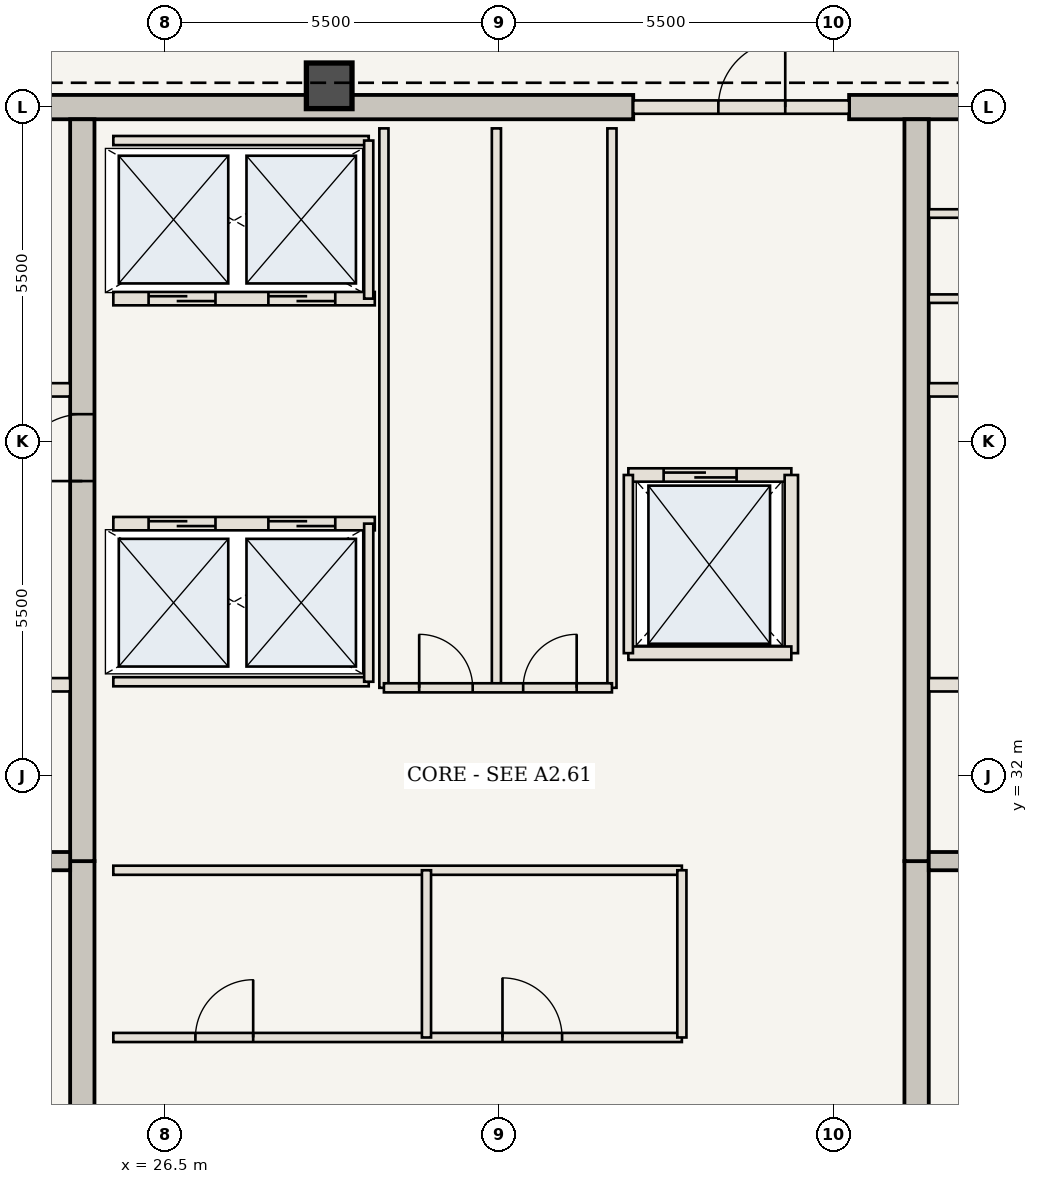
"""IFC4 building model, lengths in metres.
Left out: names, types, materials, properties, quantities, classifications, styles, units other than length and angle.
Written with IfcOpenShell. Run it as: python <this file> out.ifc"""

import sys

from ifc_helpers import new_model, si_unit, direction, frame, frame_2d, origin, origin_2d, place, context, subcontext, project, spatial, rectangle, extrude, element, fill, save


model = new_model("IFC4")
c1 = context("Model", 3, precision=1e-05, world=origin(), true_north=direction((0.0, 1.0)))
c2 = subcontext(c1, "Body", "Model", "MODEL_VIEW")
j1 = project(units=[si_unit("LENGTHUNIT", "METRE"), si_unit("PLANEANGLEUNIT", "RADIAN")], contexts=[c1])
p1 = place(None, origin())
s1 = spatial("IfcSite", under=j1, at=p1, CompositionType="ELEMENT")
p2 = place(p1, origin())
s2 = spatial("IfcBuilding", under=s1, at=p2, CompositionType="ELEMENT")
p3 = place(p2, frame((0.0, 0.0, 281.4)))
s3 = spatial("IfcBuildingStorey", under=s2, at=p3, CompositionType="ELEMENT", Elevation=281.4)
p4 = place(p3, frame((21.41, 43.0, 0.0), z_axis=(0.0, 0.0, 1.0), x_axis=(1.0, 0.0, 0.0)))
e1 = element("IfcWall", 1, at=p4, inside=s3, PredefinedType="SHEAR", context=c2, shape_type="SweptSolid", body=[
    extrude(rectangle(XDim=12.79, YDim=0.4, at=frame_2d((6.395, 0.0))), origin(), (0.0, 0.0, 1.0), 3.85),
])
p5 = place(p3, frame((37.75, 43.0, 0.0), z_axis=(0.0, 0.0, 1.0), x_axis=(1.0, 0.0, 0.0)))
e2 = element("IfcWall", 2, at=p5, inside=s3, PredefinedType="SHEAR", context=c2, shape_type="SweptSolid", body=[
    extrude(rectangle(XDim=4.84, YDim=0.4, at=frame_2d((2.42, 0.0))), origin(), (0.0, 0.0, 1.0), 3.85),
])
p6 = place(p3, frame((25.14, 21.15, 0.0), z_axis=(0.0, 0.0, 1.0), x_axis=(0.0, 1.0, 0.0)))
e3 = element("IfcWall", 3, at=p6, inside=s3, PredefinedType="SHEAR", context=c2, shape_type="SweptSolid", body=[
    extrude(rectangle(XDim=9.45, YDim=0.4, at=frame_2d((4.725, 0.0))), origin(), (0.0, 0.0, 1.0), 3.85),
])
p7 = place(p3, frame((25.14, 30.6, 0.0), z_axis=(0.0, 0.0, 1.0), x_axis=(0.0, 1.0, 0.0)))
e4 = element("IfcWall", 4, at=p7, inside=s3, PredefinedType="SHEAR", context=c2, shape_type="SweptSolid", body=[
    extrude(rectangle(XDim=12.2, YDim=0.4, at=frame_2d((6.1, 0.0))), origin(), (0.0, 0.0, 1.0), 3.85),
])
p8 = place(p7, frame((6.25, 0.0, 0.0)))
e5 = element("IfcOpeningElement", 5, at=p8, cuts=e4, PredefinedType="OPENING", context=c2, shape_type="SweptSolid", body=[
    extrude(rectangle(XDim=1.1, YDim=2.15, at=frame_2d((0.55, 1.075))), frame((0.0, 0.21, 0.0), z_axis=(0.0, -1.0, 0.0), x_axis=(1.0, 0.0, 0.0)), (0.0, 0.0, 1.0), 0.42),
])
p9 = place(p3, frame((38.86, 21.15, 0.0), z_axis=(0.0, 0.0, 1.0), x_axis=(0.0, 1.0, 0.0)))
e6 = element("IfcWall", 6, at=p9, inside=s3, PredefinedType="SHEAR", context=c2, shape_type="SweptSolid", body=[
    extrude(rectangle(XDim=9.45, YDim=0.4, at=frame_2d((4.725, 0.0))), origin(), (0.0, 0.0, 1.0), 3.85),
])
p10 = place(p3, frame((38.86, 30.6, 0.0), z_axis=(0.0, 0.0, 1.0), x_axis=(0.0, 1.0, 0.0)))
e7 = element("IfcWall", 7, at=p10, inside=s3, PredefinedType="SHEAR", context=c2, shape_type="SweptSolid", body=[
    extrude(rectangle(XDim=12.2, YDim=0.4, at=frame_2d((6.1, 0.0))), origin(), (0.0, 0.0, 1.0), 3.85),
])
p11 = place(p3, frame((29.2, 43.35, 0.0), z_axis=(0.0, 0.0, 1.0), x_axis=(1.0, 0.0, 0.0)))
e8 = element("IfcColumn", 8, at=p11, inside=s3, PredefinedType="COLUMN", context=c2, shape_type="SweptSolid", body=[
    extrude(rectangle(XDim=0.75, YDim=0.75, at=origin_2d()), origin(), (0.0, 0.0, 1.0), 3.85),
])
for number, where, z_axis, x_axis in (
    (9, (21.41, 30.6, 0.0), (0.0, 0.0, 1.0), (1.0, 0.0, 0.0)),
    (10, (39.06, 30.6, 0.0), (0.0, 0.0, 1.0), (1.0, 0.0, 0.0)),
):
    element("IfcWall", number, at=place(p3, frame(where, z_axis=z_axis, x_axis=x_axis)), inside=s3, PredefinedType="SHEAR", context=c2, shape_type="SweptSolid", body=[
        extrude(rectangle(XDim=3.53, YDim=0.3, at=frame_2d((1.765, 0.0))), origin(), (0.0, 0.0, 1.0), 3.685),
    ])
p12 = place(p3, frame((21.41, 33.5, 0.0), z_axis=(0.0, 0.0, 1.0), x_axis=(1.0, 0.0, 0.0)))
e11 = element("IfcWall", 11, at=p12, inside=s3, PredefinedType="STANDARD", context=c2, shape_type="SweptSolid", body=[
    extrude(rectangle(XDim=3.53, YDim=0.22, at=frame_2d((1.765, 0.0))), origin(), (0.0, 0.0, 1.0), 3.685),
])
p13 = place(p12, frame((0.75, 0.0, 0.0)))
e12 = element("IfcOpeningElement", 12, at=p13, cuts=e11, PredefinedType="OPENING", context=c2, shape_type="SweptSolid", body=[
    extrude(rectangle(XDim=1.2, YDim=2.2, at=frame_2d((0.6, 1.1))), frame((0.0, 0.12, 0.0), z_axis=(0.0, -1.0, 0.0), x_axis=(1.0, 0.0, 0.0)), (0.0, 0.0, 1.0), 0.24),
])
p14 = place(p3, frame((39.06, 33.5, 0.0), z_axis=(0.0, 0.0, 1.0), x_axis=(1.0, 0.0, 0.0)))
e13 = element("IfcWall", 13, at=p14, inside=s3, PredefinedType="STANDARD", context=c2, shape_type="SweptSolid", body=[
    extrude(rectangle(XDim=3.53, YDim=0.22, at=frame_2d((1.765, 0.0))), origin(), (0.0, 0.0, 1.0), 3.685),
])
p15 = place(p14, frame((1.55, 0.0, 0.0)))
e14 = element("IfcOpeningElement", 14, at=p15, cuts=e13, PredefinedType="OPENING", context=c2, shape_type="SweptSolid", body=[
    extrude(rectangle(XDim=1.2, YDim=2.2, at=frame_2d((0.6, 1.1))), frame((0.0, 0.12, 0.0), z_axis=(0.0, -1.0, 0.0), x_axis=(1.0, 0.0, 0.0)), (0.0, 0.0, 1.0), 0.24),
])
for number, where, z_axis, x_axis in (
    (15, (21.41, 38.35, 0.0), (0.0, 0.0, 1.0), (1.0, 0.0, 0.0)),
    (16, (39.06, 38.35, 0.0), (0.0, 0.0, 1.0), (1.0, 0.0, 0.0)),
):
    element("IfcWall", number, at=place(p3, frame(where, z_axis=z_axis, x_axis=x_axis)), inside=s3, PredefinedType="STANDARD", context=c2, shape_type="SweptSolid", body=[
        extrude(rectangle(XDim=3.53, YDim=0.22, at=frame_2d((1.765, 0.0))), origin(), (0.0, 0.0, 1.0), 3.685),
    ])
for number, where, z_axis, x_axis in (
    (17, (39.06, 39.85, 0.0), (0.0, 0.0, 1.0), (1.0, 0.0, 0.0)),
    (18, (39.06, 41.25, 0.0), (0.0, 0.0, 1.0), (1.0, 0.0, 0.0)),
):
    element("IfcWall", number, at=place(p3, frame(where, z_axis=z_axis, x_axis=x_axis)), inside=s3, PredefinedType="STANDARD", context=c2, shape_type="SweptSolid", body=[
        extrude(rectangle(XDim=3.53, YDim=0.14, at=frame_2d((1.765, 0.0))), origin(), (0.0, 0.0, 1.0), 3.685),
    ])
p16 = place(p3, frame((25.65, 27.7, 0.0), z_axis=(0.0, 0.0, 1.0), x_axis=(1.0, 0.0, 0.0)))
e19 = element("IfcWall", 19, at=p16, inside=s3, PredefinedType="STANDARD", context=c2, shape_type="SweptSolid", body=[
    extrude(rectangle(XDim=9.35, YDim=0.15, at=frame_2d((4.675, 0.0))), origin(), (0.0, 0.0, 1.0), 3.685),
])
p17 = place(p16, frame((1.35, 0.0, 0.0)))
e20 = element("IfcOpeningElement", 20, at=p17, cuts=e19, PredefinedType="OPENING", context=c2, shape_type="SweptSolid", body=[
    extrude(rectangle(XDim=0.95, YDim=2.15, at=frame_2d((0.475, 1.075))), frame((0.0, 0.085, 0.0), z_axis=(0.0, -1.0, 0.0), x_axis=(1.0, 0.0, 0.0)), (0.0, 0.0, 1.0), 0.17),
])
p18 = place(p16, frame((6.4, 0.0, 0.0)))
e21 = element("IfcOpeningElement", 21, at=p18, cuts=e19, PredefinedType="OPENING", context=c2, shape_type="SweptSolid", body=[
    extrude(rectangle(XDim=0.98, YDim=2.2, at=frame_2d((0.49, 1.1))), frame((0.0, 0.085, 0.0), z_axis=(0.0, -1.0, 0.0), x_axis=(1.0, 0.0, 0.0)), (0.0, 0.0, 1.0), 0.17),
])
p19 = place(p3, frame((25.65, 30.45, 0.0), z_axis=(0.0, 0.0, 1.0), x_axis=(1.0, 0.0, 0.0)))
e22 = element("IfcWall", 22, at=p19, inside=s3, PredefinedType="STANDARD", context=c2, shape_type="SweptSolid", body=[
    extrude(rectangle(XDim=9.35, YDim=0.15, at=frame_2d((4.675, 0.0))), origin(), (0.0, 0.0, 1.0), 3.685),
])
for number, where, z_axis, x_axis in (
    (23, (30.8, 27.7, 0.0), (0.0, 0.0, 1.0), (0.0, 1.0, 0.0)),
    (24, (35.0, 27.7, 0.0), (0.0, 0.0, 1.0), (0.0, 1.0, 0.0)),
):
    element("IfcWall", number, at=place(p3, frame(where, z_axis=z_axis, x_axis=x_axis)), inside=s3, PredefinedType="STANDARD", context=c2, shape_type="SweptSolid", body=[
        extrude(rectangle(XDim=2.75, YDim=0.15, at=frame_2d((1.375, 0.0))), origin(), (0.0, 0.0, 1.0), 3.685),
    ])
p20 = place(p3, frame((25.65, 36.15, 0.0), z_axis=(0.0, 0.0, 1.0), x_axis=(1.0, 0.0, 0.0)))
e25 = element("IfcWall", 25, at=p20, inside=s3, PredefinedType="STANDARD", context=c2, shape_type="SweptSolid", body=[
    extrude(rectangle(XDim=4.3, YDim=0.22, at=frame_2d((2.15, 0.0))), origin(), (0.0, 0.0, 1.0), 3.685),
])
p21 = place(p20, frame((0.58, 0.0, 0.0)))
e26 = element("IfcOpeningElement", 26, at=p21, cuts=e25, PredefinedType="OPENING", context=c2, shape_type="SweptSolid", body=[
    extrude(rectangle(XDim=1.1, YDim=2.15, at=frame_2d((0.55, 1.075))), frame((0.0, 0.12, 0.0), z_axis=(0.0, -1.0, 0.0), x_axis=(1.0, 0.0, 0.0)), (0.0, 0.0, 1.0), 0.24),
])
p22 = place(p20, frame((2.55, 0.0, 0.0)))
e27 = element("IfcOpeningElement", 27, at=p22, cuts=e25, PredefinedType="OPENING", context=c2, shape_type="SweptSolid", body=[
    extrude(rectangle(XDim=1.1, YDim=2.15, at=frame_2d((0.55, 1.075))), frame((0.0, 0.12, 0.0), z_axis=(0.0, -1.0, 0.0), x_axis=(1.0, 0.0, 0.0)), (0.0, 0.0, 1.0), 0.24),
])
p23 = place(p3, frame((25.65, 33.55, 0.0), z_axis=(0.0, 0.0, 1.0), x_axis=(1.0, 0.0, 0.0)))
e28 = element("IfcWall", 28, at=p23, inside=s3, PredefinedType="STANDARD", context=c2, shape_type="SweptSolid", body=[
    extrude(rectangle(XDim=4.2, YDim=0.15, at=frame_2d((2.1, 0.0))), origin(), (0.0, 0.0, 1.0), 3.685),
])
p24 = place(p3, frame((29.85, 33.55, 0.0), z_axis=(0.0, 0.0, 1.0), x_axis=(0.0, 1.0, 0.0)))
e29 = element("IfcWall", 29, at=p24, inside=s3, PredefinedType="STANDARD", context=c2, shape_type="SweptSolid", body=[
    extrude(rectangle(XDim=2.6, YDim=0.15, at=frame_2d((1.3, 0.0))), origin(), (0.0, 0.0, 1.0), 3.685),
])
p25 = place(p3, frame((25.65, 39.85, 0.0), z_axis=(0.0, 0.0, 1.0), x_axis=(1.0, 0.0, 0.0)))
e30 = element("IfcWall", 30, at=p25, inside=s3, PredefinedType="STANDARD", context=c2, shape_type="SweptSolid", body=[
    extrude(rectangle(XDim=4.3, YDim=0.22, at=frame_2d((2.15, 0.0))), origin(), (0.0, 0.0, 1.0), 3.685),
])
p26 = place(p25, frame((0.58, 0.0, 0.0)))
e31 = element("IfcOpeningElement", 31, at=p26, cuts=e30, PredefinedType="OPENING", context=c2, shape_type="SweptSolid", body=[
    extrude(rectangle(XDim=1.1, YDim=2.15, at=frame_2d((0.55, 1.075))), frame((0.0, 0.12, 0.0), z_axis=(0.0, -1.0, 0.0), x_axis=(1.0, 0.0, 0.0)), (0.0, 0.0, 1.0), 0.24),
])
p27 = place(p25, frame((2.55, 0.0, 0.0)))
e32 = element("IfcOpeningElement", 32, at=p27, cuts=e30, PredefinedType="OPENING", context=c2, shape_type="SweptSolid", body=[
    extrude(rectangle(XDim=1.1, YDim=2.15, at=frame_2d((0.55, 1.075))), frame((0.0, 0.12, 0.0), z_axis=(0.0, -1.0, 0.0), x_axis=(1.0, 0.0, 0.0)), (0.0, 0.0, 1.0), 0.24),
])
p28 = place(p3, frame((25.65, 42.45, 0.0), z_axis=(0.0, 0.0, 1.0), x_axis=(1.0, 0.0, 0.0)))
e33 = element("IfcWall", 33, at=p28, inside=s3, PredefinedType="STANDARD", context=c2, shape_type="SweptSolid", body=[
    extrude(rectangle(XDim=4.2, YDim=0.15, at=frame_2d((2.1, 0.0))), origin(), (0.0, 0.0, 1.0), 3.685),
])
p29 = place(p3, frame((29.85, 39.85, 0.0), z_axis=(0.0, 0.0, 1.0), x_axis=(0.0, 1.0, 0.0)))
e34 = element("IfcWall", 34, at=p29, inside=s3, PredefinedType="STANDARD", context=c2, shape_type="SweptSolid", body=[
    extrude(rectangle(XDim=2.6, YDim=0.15, at=frame_2d((1.3, 0.0))), origin(), (0.0, 0.0, 1.0), 3.685),
])
for number, where, z_axis, x_axis in (
    (35, (30.1, 33.45, 0.0), (0.0, 0.0, 1.0), (0.0, 1.0, 0.0)),
    (36, (31.95, 33.45, 0.0), (0.0, 0.0, 1.0), (0.0, 1.0, 0.0)),
    (37, (33.85, 33.45, 0.0), (0.0, 0.0, 1.0), (0.0, 1.0, 0.0)),
):
    element("IfcWall", number, at=place(p3, frame(where, z_axis=z_axis, x_axis=x_axis)), inside=s3, PredefinedType="STANDARD", context=c2, shape_type="SweptSolid", body=[
        extrude(rectangle(XDim=9.2, YDim=0.15, at=frame_2d((4.6, 0.0))), origin(), (0.0, 0.0, 1.0), 3.685),
    ])
p30 = place(p3, frame((30.1, 33.45, 0.0), z_axis=(0.0, 0.0, 1.0), x_axis=(1.0, 0.0, 0.0)))
e38 = element("IfcWall", 38, at=p30, inside=s3, PredefinedType="STANDARD", context=c2, shape_type="SweptSolid", body=[
    extrude(rectangle(XDim=3.75, YDim=0.15, at=frame_2d((1.875, 0.0))), origin(), (0.0, 0.0, 1.0), 3.685),
])
p31 = place(p30, frame((0.58, 0.0, 0.0)))
e39 = element("IfcOpeningElement", 39, at=p31, cuts=e38, PredefinedType="OPENING", context=c2, shape_type="SweptSolid", body=[
    extrude(rectangle(XDim=0.88, YDim=2.1, at=frame_2d((0.44, 1.05))), frame((0.0, 0.085, 0.0), z_axis=(0.0, -1.0, 0.0), x_axis=(1.0, 0.0, 0.0)), (0.0, 0.0, 1.0), 0.17),
])
p32 = place(p30, frame((2.29, 0.0, 0.0)))
e40 = element("IfcOpeningElement", 40, at=p32, cuts=e38, PredefinedType="OPENING", context=c2, shape_type="SweptSolid", body=[
    extrude(rectangle(XDim=0.88, YDim=2.1, at=frame_2d((0.44, 1.05))), frame((0.0, 0.085, 0.0), z_axis=(0.0, -1.0, 0.0), x_axis=(1.0, 0.0, 0.0)), (0.0, 0.0, 1.0), 0.17),
])
p33 = place(p3, frame((34.2, 43.0, 0.0), z_axis=(0.0, 0.0, 1.0), x_axis=(1.0, 0.0, 0.0)))
e41 = element("IfcWall", 41, at=p33, inside=s3, PredefinedType="STANDARD", context=c2, shape_type="SweptSolid", body=[
    extrude(rectangle(XDim=3.55, YDim=0.22, at=frame_2d((1.775, 0.0))), origin(), (0.0, 0.0, 1.0), 3.685),
])
p34 = place(p33, frame((1.4, 0.0, 0.0)))
e42 = element("IfcOpeningElement", 42, at=p34, cuts=e41, PredefinedType="OPENING", context=c2, shape_type="SweptSolid", body=[
    extrude(rectangle(XDim=1.1, YDim=2.15, at=frame_2d((0.55, 1.075))), frame((0.0, 0.12, 0.0), z_axis=(0.0, -1.0, 0.0), x_axis=(1.0, 0.0, 0.0)), (0.0, 0.0, 1.0), 0.24),
])
p35 = place(p3, frame((34.12, 36.95, 0.0), z_axis=(0.0, 0.0, 1.0), x_axis=(1.0, 0.0, 0.0)))
e43 = element("IfcWall", 43, at=p35, inside=s3, PredefinedType="STANDARD", context=c2, shape_type="SweptSolid", body=[
    extrude(rectangle(XDim=2.68, YDim=0.22, at=frame_2d((1.34, 0.0))), origin(), (0.0, 0.0, 1.0), 3.685),
])
p36 = place(p35, frame((0.58, 0.0, 0.0)))
e44 = element("IfcOpeningElement", 44, at=p36, cuts=e43, PredefinedType="OPENING", context=c2, shape_type="SweptSolid", body=[
    extrude(rectangle(XDim=1.2, YDim=2.2, at=frame_2d((0.6, 1.1))), frame((0.0, 0.12, 0.0), z_axis=(0.0, -1.0, 0.0), x_axis=(1.0, 0.0, 0.0)), (0.0, 0.0, 1.0), 0.24),
])
p37 = place(p3, frame((36.8, 34.02, 0.0), z_axis=(0.0, 0.0, 1.0), x_axis=(0.0, 1.0, 0.0)))
e45 = element("IfcWall", 45, at=p37, inside=s3, PredefinedType="STANDARD", context=c2, shape_type="SweptSolid", body=[
    extrude(rectangle(XDim=2.93, YDim=0.22, at=frame_2d((1.465, 0.0))), origin(), (0.0, 0.0, 1.0), 3.685),
])
p38 = place(p3, frame((34.12, 34.02, 0.0), z_axis=(0.0, 0.0, 1.0), x_axis=(1.0, 0.0, 0.0)))
e46 = element("IfcWall", 46, at=p38, inside=s3, PredefinedType="STANDARD", context=c2, shape_type="SweptSolid", body=[
    extrude(rectangle(XDim=2.68, YDim=0.22, at=frame_2d((1.34, 0.0))), origin(), (0.0, 0.0, 1.0), 3.685),
])
p39 = place(p3, frame((34.12, 34.02, 0.0), z_axis=(0.0, 0.0, 1.0), x_axis=(0.0, 1.0, 0.0)))
e47 = element("IfcWall", 47, at=p39, inside=s3, PredefinedType="STANDARD", context=c2, shape_type="SweptSolid", body=[
    extrude(rectangle(XDim=2.93, YDim=0.15, at=frame_2d((1.465, 0.0))), origin(), (0.0, 0.0, 1.0), 3.685),
])
p40 = place(p8, origin())
e48 = element("IfcDoor", 48, at=p40, inside=s3, OperationType="SINGLE_SWING_LEFT", PredefinedType="DOOR", context=c2, shape_type="SweptSolid", body=[
    extrude(rectangle(XDim=1.1, YDim=2.15, at=frame_2d((0.55, 1.075))), frame((0.0, 0.025, 0.0), z_axis=(0.0, -1.0, 0.0), x_axis=(1.0, 0.0, 0.0)), (0.0, 0.0, 1.0), 0.05),
])
fill(e5, e48)
p41 = place(p17, origin())
e49 = element("IfcDoor", 49, at=p41, inside=s3, OperationType="SINGLE_SWING_RIGHT", PredefinedType="DOOR", context=c2, shape_type="SweptSolid", body=[
    extrude(rectangle(XDim=0.95, YDim=2.15, at=frame_2d((0.475, 1.075))), frame((0.0, 0.025, 0.0), z_axis=(0.0, -1.0, 0.0), x_axis=(1.0, 0.0, 0.0)), (0.0, 0.0, 1.0), 0.05),
])
fill(e20, e49)
p42 = place(p18, origin())
e50 = element("IfcDoor", 50, at=p42, inside=s3, OperationType="SINGLE_SWING_LEFT", PredefinedType="DOOR", context=c2, shape_type="SweptSolid", body=[
    extrude(rectangle(XDim=0.98, YDim=2.2, at=frame_2d((0.49, 1.1))), frame((0.0, 0.025, 0.0), z_axis=(0.0, -1.0, 0.0), x_axis=(1.0, 0.0, 0.0)), (0.0, 0.0, 1.0), 0.05),
])
fill(e21, e50)
p43 = place(p21, origin())
e51 = element("IfcDoor", 51, at=p43, inside=s3, OperationType="DOUBLE_DOOR_SLIDING", PredefinedType="DOOR", context=c2, shape_type="SweptSolid", body=[
    extrude(rectangle(XDim=1.1, YDim=2.15, at=frame_2d((0.55, 1.075))), frame((0.0, 0.025, 0.0), z_axis=(0.0, -1.0, 0.0), x_axis=(1.0, 0.0, 0.0)), (0.0, 0.0, 1.0), 0.05),
])
fill(e26, e51)
p44 = place(p22, origin())
e52 = element("IfcDoor", 52, at=p44, inside=s3, OperationType="DOUBLE_DOOR_SLIDING", PredefinedType="DOOR", context=c2, shape_type="SweptSolid", body=[
    extrude(rectangle(XDim=1.1, YDim=2.15, at=frame_2d((0.55, 1.075))), frame((0.0, 0.025, 0.0), z_axis=(0.0, -1.0, 0.0), x_axis=(1.0, 0.0, 0.0)), (0.0, 0.0, 1.0), 0.05),
])
fill(e27, e52)
p45 = place(p26, origin())
e53 = element("IfcDoor", 53, at=p45, inside=s3, OperationType="DOUBLE_DOOR_SLIDING", PredefinedType="DOOR", context=c2, shape_type="SweptSolid", body=[
    extrude(rectangle(XDim=1.1, YDim=2.15, at=frame_2d((0.55, 1.075))), frame((0.0, 0.025, 0.0), z_axis=(0.0, -1.0, 0.0), x_axis=(1.0, 0.0, 0.0)), (0.0, 0.0, 1.0), 0.05),
])
fill(e31, e53)
p46 = place(p27, origin())
e54 = element("IfcDoor", 54, at=p46, inside=s3, OperationType="DOUBLE_DOOR_SLIDING", PredefinedType="DOOR", context=c2, shape_type="SweptSolid", body=[
    extrude(rectangle(XDim=1.1, YDim=2.15, at=frame_2d((0.55, 1.075))), frame((0.0, 0.025, 0.0), z_axis=(0.0, -1.0, 0.0), x_axis=(1.0, 0.0, 0.0)), (0.0, 0.0, 1.0), 0.05),
])
fill(e32, e54)
p47 = place(p31, origin())
e55 = element("IfcDoor", 55, at=p47, inside=s3, OperationType="SINGLE_SWING_LEFT", PredefinedType="DOOR", context=c2, shape_type="SweptSolid", body=[
    extrude(rectangle(XDim=0.88, YDim=2.1, at=frame_2d((0.44, 1.05))), frame((0.0, 0.025, 0.0), z_axis=(0.0, -1.0, 0.0), x_axis=(1.0, 0.0, 0.0)), (0.0, 0.0, 1.0), 0.05),
])
fill(e39, e55)
p48 = place(p32, origin())
e56 = element("IfcDoor", 56, at=p48, inside=s3, OperationType="SINGLE_SWING_RIGHT", PredefinedType="DOOR", context=c2, shape_type="SweptSolid", body=[
    extrude(rectangle(XDim=0.88, YDim=2.1, at=frame_2d((0.44, 1.05))), frame((0.0, 0.025, 0.0), z_axis=(0.0, -1.0, 0.0), x_axis=(1.0, 0.0, 0.0)), (0.0, 0.0, 1.0), 0.05),
])
fill(e40, e56)
p49 = place(p34, origin())
e57 = element("IfcDoor", 57, at=p49, inside=s3, OperationType="SINGLE_SWING_RIGHT", PredefinedType="DOOR", context=c2, shape_type="SweptSolid", body=[
    extrude(rectangle(XDim=1.1, YDim=2.15, at=frame_2d((0.55, 1.075))), frame((0.0, 0.025, 0.0), z_axis=(0.0, -1.0, 0.0), x_axis=(1.0, 0.0, 0.0)), (0.0, 0.0, 1.0), 0.05),
])
fill(e42, e57)
p50 = place(p36, origin())
e58 = element("IfcDoor", 58, at=p50, inside=s3, OperationType="DOUBLE_DOOR_SLIDING", PredefinedType="DOOR", context=c2, shape_type="SweptSolid", body=[
    extrude(rectangle(XDim=1.2, YDim=2.2, at=frame_2d((0.6, 1.1))), frame((0.0, 0.025, 0.0), z_axis=(0.0, -1.0, 0.0), x_axis=(1.0, 0.0, 0.0)), (0.0, 0.0, 1.0), 0.05),
])
fill(e44, e58)
save(model, sys.argv[1])
